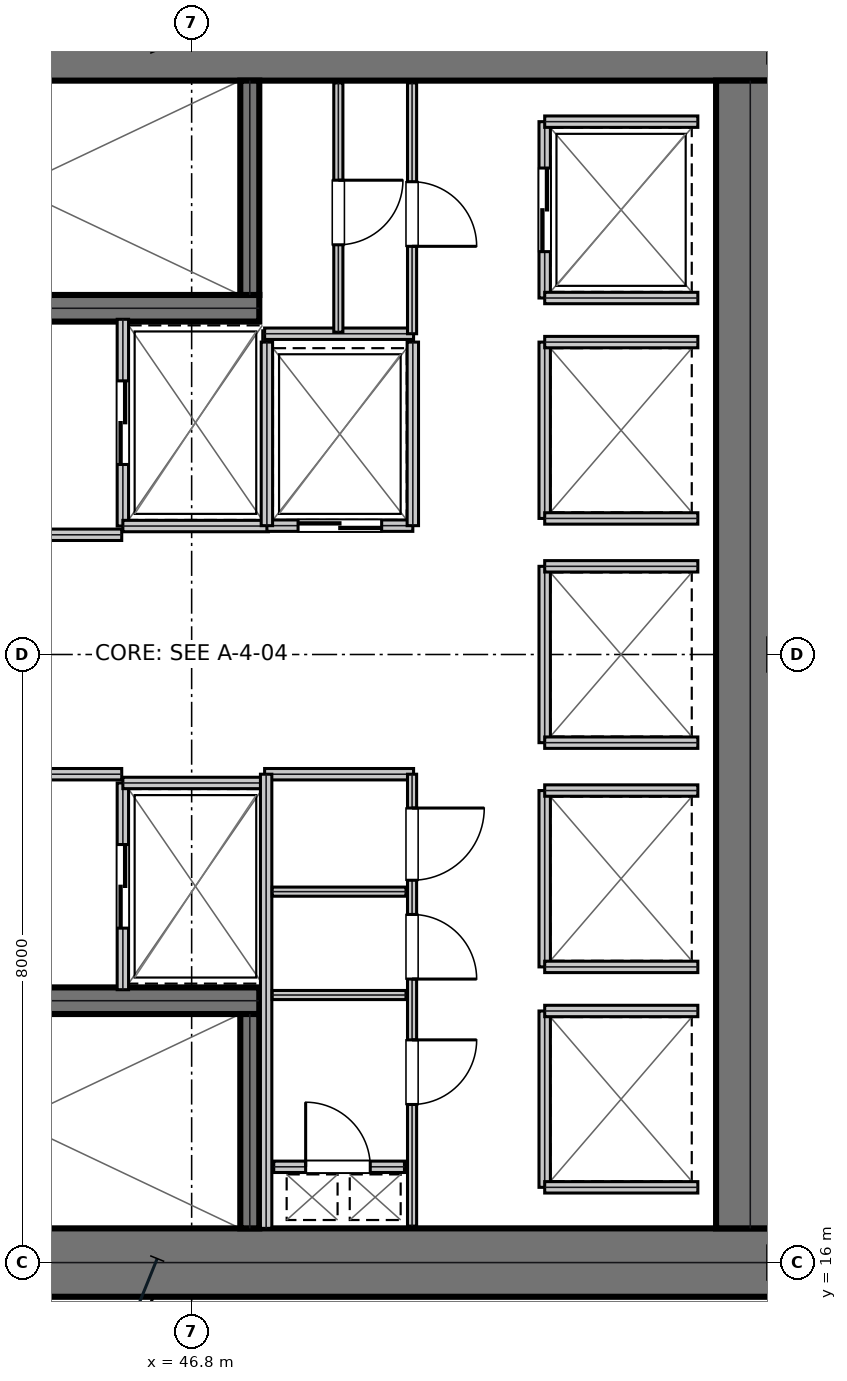
"""IFC4 building model, lengths in metres.
Left out: names, types, materials, properties, quantities, classifications, styles, units other than length and angle.
Written with IfcOpenShell. Run it as: python <this file> out.ifc"""

import sys

from ifc_helpers import new_model, si_unit, direction, frame, frame_2d, origin, place, context, subcontext, project, spatial, rectangle, extrude, element, fill, save


model = new_model("IFC4")
c1 = context("Model", 3, precision=1e-05, world=origin(), true_north=direction((0.0, 1.0)))
c2 = subcontext(c1, "Body", "Model", "MODEL_VIEW")
j1 = project(units=[si_unit("LENGTHUNIT", "METRE"), si_unit("PLANEANGLEUNIT", "RADIAN")], contexts=[c1])
p1 = place(None, origin())
s1 = spatial("IfcSite", under=j1, at=p1, CompositionType="ELEMENT")
p2 = place(p1, origin())
s2 = spatial("IfcBuilding", under=s1, at=p2, CompositionType="ELEMENT")
p3 = place(p2, frame((0.0, 0.0, 70.2)))
s3 = spatial("IfcBuildingStorey", under=s2, at=p3, CompositionType="ELEMENT", Elevation=70.2)
for number, where, z_axis, x_axis in (
    (1, (38.8, 32.0, 0.0), (0.0, 0.0, 1.0), (1.0, 0.0, 0.0)),
    (2, (38.8, 16.0, 0.0), (0.0, 0.0, 1.0), (1.0, 0.0, 0.0)),
):
    element("IfcWall", number, at=place(p3, frame(where, z_axis=z_axis, x_axis=x_axis)), inside=s3, PredefinedType="SHEAR", context=c2, shape_type="SweptSolid", body=[
        extrude(rectangle(XDim=16.0, YDim=0.9, at=frame_2d((8.0, 0.0))), origin(), (0.0, 0.0, 1.0), 3.81),
    ])
p4 = place(p3, frame((54.15, 16.45, 0.0), z_axis=(0.0, 0.0, 1.0), x_axis=(0.0, 1.0, 0.0)))
e3 = element("IfcWall", 3, at=p4, inside=s3, PredefinedType="SHEAR", context=c2, shape_type="SweptSolid", body=[
    extrude(rectangle(XDim=15.1, YDim=0.9, at=frame_2d((7.55, 0.0))), origin(), (0.0, 0.0, 1.0), 3.81),
])
p5 = place(p3, frame((39.98, 28.555, 0.0), z_axis=(0.0, 0.0, 1.0), x_axis=(1.0, 0.0, 0.0)))
e4 = element("IfcWall", 4, at=p5, inside=s3, PredefinedType="SHEAR", context=c2, shape_type="SweptSolid", body=[
    extrude(rectangle(XDim=7.71, YDim=0.35, at=frame_2d((3.855, 0.0))), origin(), (0.0, 0.0, 1.0), 3.81),
])
p6 = place(p5, frame((0.25, 0.0, 0.0)))
e5 = element("IfcOpeningElement", 5, at=p6, cuts=e4, PredefinedType="OPENING", context=c2, shape_type="SweptSolid", body=[
    extrude(rectangle(XDim=1.1, YDim=2.15, at=frame_2d((0.55, 1.075))), frame((0.0, 0.185, 0.0), z_axis=(0.0, -1.0, 0.0), x_axis=(1.0, 0.0, 0.0)), (0.0, 0.0, 1.0), 0.37),
])
p7 = place(p3, frame((39.98, 19.445, 0.0), z_axis=(0.0, 0.0, 1.0), x_axis=(1.0, 0.0, 0.0)))
e6 = element("IfcWall", 6, at=p7, inside=s3, PredefinedType="SHEAR", context=c2, shape_type="SweptSolid", body=[
    extrude(rectangle(XDim=7.71, YDim=0.35, at=frame_2d((3.855, 0.0))), origin(), (0.0, 0.0, 1.0), 3.81),
])
p8 = place(p7, frame((0.25, 0.0, 0.0)))
e7 = element("IfcOpeningElement", 7, at=p8, cuts=e6, PredefinedType="OPENING", context=c2, shape_type="SweptSolid", body=[
    extrude(rectangle(XDim=1.1, YDim=2.15, at=frame_2d((0.55, 1.075))), frame((0.0, 0.185, 0.0), z_axis=(0.0, -1.0, 0.0), x_axis=(1.0, 0.0, 0.0)), (0.0, 0.0, 1.0), 0.37),
])
for number, where, z_axis, x_axis in (
    (8, (47.565, 28.73, 0.0), (0.0, 0.0, 1.0), (0.0, 1.0, 0.0)),
    (9, (47.565, 16.45, 0.0), (0.0, 0.0, 1.0), (0.0, 1.0, 0.0)),
):
    element("IfcWall", number, at=place(p3, frame(where, z_axis=z_axis, x_axis=x_axis)), inside=s3, PredefinedType="SHEAR", context=c2, shape_type="SweptSolid", body=[
        extrude(rectangle(XDim=2.82, YDim=0.25, at=frame_2d((1.41, 0.0))), origin(), (0.0, 0.0, 1.0), 3.81),
    ])
p9 = place(p3, frame((39.98, 25.575, 0.0), z_axis=(0.0, 0.0, 1.0), x_axis=(1.0, 0.0, 0.0)))
e10 = element("IfcWall", 10, at=p9, inside=s3, PredefinedType="PARTITIONING", context=c2, shape_type="SweptSolid", body=[
    extrude(rectangle(XDim=5.9, YDim=0.15, at=frame_2d((2.95, 0.0))), origin(), (0.0, 0.0, 1.0), 3.81),
])
p10 = place(p9, frame((2.35, 0.0, 0.0)))
e11 = element("IfcOpeningElement", 11, at=p10, cuts=e10, PredefinedType="OPENING", context=c2, shape_type="SweptSolid", body=[
    extrude(rectangle(XDim=1.05, YDim=2.15, at=frame_2d((0.525, 1.075))), frame((0.0, 0.085, 0.0), z_axis=(0.0, -1.0, 0.0), x_axis=(1.0, 0.0, 0.0)), (0.0, 0.0, 1.0), 0.17),
])
p11 = place(p3, frame((39.98, 22.425, 0.0), z_axis=(0.0, 0.0, 1.0), x_axis=(1.0, 0.0, 0.0)))
e12 = element("IfcWall", 12, at=p11, inside=s3, PredefinedType="PARTITIONING", context=c2, shape_type="SweptSolid", body=[
    extrude(rectangle(XDim=5.9, YDim=0.15, at=frame_2d((2.95, 0.0))), origin(), (0.0, 0.0, 1.0), 3.81),
])
p12 = place(p11, frame((2.35, 0.0, 0.0)))
e13 = element("IfcOpeningElement", 13, at=p12, cuts=e12, PredefinedType="OPENING", context=c2, shape_type="SweptSolid", body=[
    extrude(rectangle(XDim=1.05, YDim=2.15, at=frame_2d((0.525, 1.075))), frame((0.0, 0.085, 0.0), z_axis=(0.0, -1.0, 0.0), x_axis=(1.0, 0.0, 0.0)), (0.0, 0.0, 1.0), 0.17),
])
p13 = place(p3, frame((45.895, 25.69, 0.0), z_axis=(0.0, 0.0, 1.0), x_axis=(0.0, 1.0, 0.0)))
e14 = element("IfcWall", 14, at=p13, inside=s3, PredefinedType="PARTITIONING", context=c2, shape_type="SweptSolid", body=[
    extrude(rectangle(XDim=2.72, YDim=0.15, at=frame_2d((1.36, 0.0))), origin(), (0.0, 0.0, 1.0), 3.81),
])
p14 = place(p13, frame((0.81, 0.0, 0.0)))
e15 = element("IfcOpeningElement", 15, at=p14, cuts=e14, PredefinedType="OPENING", context=c2, shape_type="SweptSolid", body=[
    extrude(rectangle(XDim=1.1, YDim=2.15, at=frame_2d((0.55, 1.075))), frame((0.0, 0.085, 0.0), z_axis=(0.0, -1.0, 0.0), x_axis=(1.0, 0.0, 0.0)), (0.0, 0.0, 1.0), 0.17),
])
p15 = place(p3, frame((45.895, 25.69, 0.0), z_axis=(0.0, 0.0, 1.0), x_axis=(1.0, 0.0, 0.0)))
e16 = element("IfcWall", 16, at=p15, inside=s3, PredefinedType="PARTITIONING", context=c2, shape_type="SweptSolid", body=[
    extrude(rectangle(XDim=1.915, YDim=0.15, at=frame_2d((0.958, 0.0))), origin(), (0.0, 0.0, 1.0), 3.81),
])
p16 = place(p3, frame((45.895, 19.59, 0.0), z_axis=(0.0, 0.0, 1.0), x_axis=(0.0, 1.0, 0.0)))
e17 = element("IfcWall", 17, at=p16, inside=s3, PredefinedType="PARTITIONING", context=c2, shape_type="SweptSolid", body=[
    extrude(rectangle(XDim=2.72, YDim=0.15, at=frame_2d((1.36, 0.0))), origin(), (0.0, 0.0, 1.0), 3.81),
])
p17 = place(p16, frame((0.81, 0.0, 0.0)))
e18 = element("IfcOpeningElement", 18, at=p17, cuts=e17, PredefinedType="OPENING", context=c2, shape_type="SweptSolid", body=[
    extrude(rectangle(XDim=1.1, YDim=2.15, at=frame_2d((0.55, 1.075))), frame((0.0, 0.085, 0.0), z_axis=(0.0, -1.0, 0.0), x_axis=(1.0, 0.0, 0.0)), (0.0, 0.0, 1.0), 0.17),
])
p18 = place(p3, frame((45.895, 22.31, 0.0), z_axis=(0.0, 0.0, 1.0), x_axis=(1.0, 0.0, 0.0)))
e19 = element("IfcWall", 19, at=p18, inside=s3, PredefinedType="PARTITIONING", context=c2, shape_type="SweptSolid", body=[
    extrude(rectangle(XDim=1.915, YDim=0.15, at=frame_2d((0.958, 0.0))), origin(), (0.0, 0.0, 1.0), 3.81),
])
p19 = place(p3, frame((47.79, 25.695, 0.0), z_axis=(0.0, 0.0, 1.0), x_axis=(1.0, 0.0, 0.0)))
e20 = element("IfcWall", 20, at=p19, inside=s3, PredefinedType="PARTITIONING", context=c2, shape_type="SweptSolid", body=[
    extrude(rectangle(XDim=1.92, YDim=0.15, at=frame_2d((0.96, 0.0))), origin(), (0.0, 0.0, 1.0), 3.81),
])
p20 = place(p19, frame((0.41, 0.0, 0.0)))
e21 = element("IfcOpeningElement", 21, at=p20, cuts=e20, PredefinedType="OPENING", context=c2, shape_type="SweptSolid", body=[
    extrude(rectangle(XDim=1.1, YDim=2.15, at=frame_2d((0.55, 1.075))), frame((0.0, 0.085, 0.0), z_axis=(0.0, -1.0, 0.0), x_axis=(1.0, 0.0, 0.0)), (0.0, 0.0, 1.0), 0.17),
])
for number, where, z_axis, x_axis in (
    (22, (47.79, 25.695, 0.0), (0.0, 0.0, 1.0), (0.0, 1.0, 0.0)),
    (23, (49.71, 25.695, 0.0), (0.0, 0.0, 1.0), (0.0, 1.0, 0.0)),
):
    element("IfcWall", number, at=place(p3, frame(where, z_axis=z_axis, x_axis=x_axis)), inside=s3, PredefinedType="PARTITIONING", context=c2, shape_type="SweptSolid", body=[
        extrude(rectangle(XDim=2.415, YDim=0.15, at=frame_2d((1.208, 0.0))), origin(), (0.0, 0.0, 1.0), 3.81),
    ])
p21 = place(p3, frame((51.445, 28.69, 0.0), z_axis=(0.0, 0.0, 1.0), x_axis=(0.0, 1.0, 0.0)))
e24 = element("IfcWall", 24, at=p21, inside=s3, PredefinedType="PARTITIONING", context=c2, shape_type="SweptSolid", body=[
    extrude(rectangle(XDim=2.32, YDim=0.15, at=frame_2d((1.16, 0.0))), origin(), (0.0, 0.0, 1.0), 3.81),
])
p22 = place(p21, frame((0.61, 0.0, 0.0)))
e25 = element("IfcOpeningElement", 25, at=p22, cuts=e24, PredefinedType="OPENING", context=c2, shape_type="SweptSolid", body=[
    extrude(rectangle(XDim=1.1, YDim=2.15, at=frame_2d((0.55, 1.075))), frame((0.0, 0.085, 0.0), z_axis=(0.0, -1.0, 0.0), x_axis=(1.0, 0.0, 0.0)), (0.0, 0.0, 1.0), 0.17),
])
for number, where, z_axis, x_axis in (
    (26, (51.445, 28.69, 0.0), (0.0, 0.0, 1.0), (1.0, 0.0, 0.0)),
    (27, (51.445, 31.01, 0.0), (0.0, 0.0, 1.0), (1.0, 0.0, 0.0)),
):
    element("IfcWall", number, at=place(p3, frame(where, z_axis=z_axis, x_axis=x_axis)), inside=s3, PredefinedType="PARTITIONING", context=c2, shape_type="SweptSolid", body=[
        extrude(rectangle(XDim=2.015, YDim=0.15, at=frame_2d((1.007, 0.0))), origin(), (0.0, 0.0, 1.0), 3.81),
    ])
p23 = place(p3, frame((51.445, 25.79, 0.0), z_axis=(0.0, 0.0, 1.0), x_axis=(0.0, 1.0, 0.0)))
e28 = element("IfcWall", 28, at=p23, inside=s3, PredefinedType="PARTITIONING", context=c2, shape_type="SweptSolid", body=[
    extrude(rectangle(XDim=2.32, YDim=0.15, at=frame_2d((1.16, 0.0))), origin(), (0.0, 0.0, 1.0), 3.81),
])
for number, where, z_axis, x_axis in (
    (29, (51.445, 25.79, 0.0), (0.0, 0.0, 1.0), (1.0, 0.0, 0.0)),
    (30, (51.445, 28.11, 0.0), (0.0, 0.0, 1.0), (1.0, 0.0, 0.0)),
):
    element("IfcWall", number, at=place(p3, frame(where, z_axis=z_axis, x_axis=x_axis)), inside=s3, PredefinedType="PARTITIONING", context=c2, shape_type="SweptSolid", body=[
        extrude(rectangle(XDim=2.015, YDim=0.15, at=frame_2d((1.007, 0.0))), origin(), (0.0, 0.0, 1.0), 3.81),
    ])
p24 = place(p3, frame((51.445, 19.89, 0.0), z_axis=(0.0, 0.0, 1.0), x_axis=(0.0, 1.0, 0.0)))
e31 = element("IfcWall", 31, at=p24, inside=s3, PredefinedType="PARTITIONING", context=c2, shape_type="SweptSolid", body=[
    extrude(rectangle(XDim=2.32, YDim=0.15, at=frame_2d((1.16, 0.0))), origin(), (0.0, 0.0, 1.0), 3.81),
])
for number, where, z_axis, x_axis in (
    (32, (51.445, 19.89, 0.0), (0.0, 0.0, 1.0), (1.0, 0.0, 0.0)),
    (33, (51.445, 22.21, 0.0), (0.0, 0.0, 1.0), (1.0, 0.0, 0.0)),
):
    element("IfcWall", number, at=place(p3, frame(where, z_axis=z_axis, x_axis=x_axis)), inside=s3, PredefinedType="PARTITIONING", context=c2, shape_type="SweptSolid", body=[
        extrude(rectangle(XDim=2.015, YDim=0.15, at=frame_2d((1.007, 0.0))), origin(), (0.0, 0.0, 1.0), 3.81),
    ])
p25 = place(p3, frame((51.445, 22.84, 0.0), z_axis=(0.0, 0.0, 1.0), x_axis=(0.0, 1.0, 0.0)))
e34 = element("IfcWall", 34, at=p25, inside=s3, PredefinedType="PARTITIONING", context=c2, shape_type="SweptSolid", body=[
    extrude(rectangle(XDim=2.32, YDim=0.15, at=frame_2d((1.16, 0.0))), origin(), (0.0, 0.0, 1.0), 3.81),
])
for number, where, z_axis, x_axis in (
    (35, (51.445, 22.84, 0.0), (0.0, 0.0, 1.0), (1.0, 0.0, 0.0)),
    (36, (51.445, 25.16, 0.0), (0.0, 0.0, 1.0), (1.0, 0.0, 0.0)),
):
    element("IfcWall", number, at=place(p3, frame(where, z_axis=z_axis, x_axis=x_axis)), inside=s3, PredefinedType="PARTITIONING", context=c2, shape_type="SweptSolid", body=[
        extrude(rectangle(XDim=2.015, YDim=0.15, at=frame_2d((1.007, 0.0))), origin(), (0.0, 0.0, 1.0), 3.81),
    ])
p26 = place(p3, frame((51.445, 16.99, 0.0), z_axis=(0.0, 0.0, 1.0), x_axis=(0.0, 1.0, 0.0)))
e37 = element("IfcWall", 37, at=p26, inside=s3, PredefinedType="PARTITIONING", context=c2, shape_type="SweptSolid", body=[
    extrude(rectangle(XDim=2.32, YDim=0.15, at=frame_2d((1.16, 0.0))), origin(), (0.0, 0.0, 1.0), 3.81),
])
for number, where, z_axis, x_axis in (
    (38, (51.445, 16.99, 0.0), (0.0, 0.0, 1.0), (1.0, 0.0, 0.0)),
    (39, (51.445, 19.31, 0.0), (0.0, 0.0, 1.0), (1.0, 0.0, 0.0)),
):
    element("IfcWall", number, at=place(p3, frame(where, z_axis=z_axis, x_axis=x_axis)), inside=s3, PredefinedType="PARTITIONING", context=c2, shape_type="SweptSolid", body=[
        extrude(rectangle(XDim=2.015, YDim=0.15, at=frame_2d((1.007, 0.0))), origin(), (0.0, 0.0, 1.0), 3.81),
    ])
p27 = place(p3, frame((47.88, 17.26, 0.0), z_axis=(0.0, 0.0, 1.0), x_axis=(1.0, 0.0, 0.0)))
e40 = element("IfcWall", 40, at=p27, inside=s3, PredefinedType="PARTITIONING", context=c2, shape_type="SweptSolid", body=[
    extrude(rectangle(XDim=1.72, YDim=0.15, at=frame_2d((0.86, 0.0))), origin(), (0.0, 0.0, 1.0), 3.81),
])
p28 = place(p27, frame((0.42, 0.0, 0.0)))
e41 = element("IfcOpeningElement", 41, at=p28, cuts=e40, PredefinedType="OPENING", context=c2, shape_type="SweptSolid", body=[
    extrude(rectangle(XDim=0.85, YDim=2.15, at=frame_2d((0.425, 1.075))), frame((0.0, 0.085, 0.0), z_axis=(0.0, -1.0, 0.0), x_axis=(1.0, 0.0, 0.0)), (0.0, 0.0, 1.0), 0.17),
])
p29 = place(p3, frame((47.76, 22.425, 0.0), z_axis=(0.0, 0.0, 1.0), x_axis=(1.0, 0.0, 0.0)))
e42 = element("IfcWall", 42, at=p29, inside=s3, PredefinedType="PARTITIONING", context=c2, shape_type="SweptSolid", body=[
    extrude(rectangle(XDim=1.96, YDim=0.15, at=frame_2d((0.98, 0.0))), origin(), (0.0, 0.0, 1.0), 3.81),
])
p30 = place(p3, frame((47.78, 16.45, 0.0), z_axis=(0.0, 0.0, 1.0), x_axis=(0.0, 1.0, 0.0)))
e43 = element("IfcWall", 43, at=p30, inside=s3, PredefinedType="PARTITIONING", context=c2, shape_type="SweptSolid", body=[
    extrude(rectangle(XDim=5.975, YDim=0.15, at=frame_2d((2.988, 0.0))), origin(), (0.0, 0.0, 1.0), 3.81),
])
for number, where, z_axis, x_axis in (
    (44, (47.86, 19.52, 0.0), (0.0, 0.0, 1.0), (1.0, 0.0, 0.0)),
    (45, (47.86, 20.88, 0.0), (0.0, 0.0, 1.0), (1.0, 0.0, 0.0)),
):
    element("IfcWall", number, at=place(p3, frame(where, z_axis=z_axis, x_axis=x_axis)), inside=s3, PredefinedType="PARTITIONING", context=c2, shape_type="SweptSolid", body=[
        extrude(rectangle(XDim=1.76, YDim=0.12, at=frame_2d((0.88, 0.0))), origin(), (0.0, 0.0, 1.0), 3.81),
    ])
p31 = place(p3, frame((49.7, 16.48, 0.0), z_axis=(0.0, 0.0, 1.0), x_axis=(0.0, 1.0, 0.0)))
e46 = element("IfcWall", 46, at=p31, inside=s3, PredefinedType="PARTITIONING", context=c2, shape_type="SweptSolid", body=[
    extrude(rectangle(XDim=5.945, YDim=0.12, at=frame_2d((2.973, 0.0))), origin(), (0.0, 0.0, 1.0), 3.81),
])
p32 = place(p31, frame((1.6, 0.0, 0.0)))
e47 = element("IfcOpeningElement", 47, at=p32, cuts=e46, PredefinedType="OPENING", context=c2, shape_type="SweptSolid", body=[
    extrude(rectangle(XDim=0.85, YDim=2.15, at=frame_2d((0.425, 1.075))), frame((0.0, 0.07, 0.0), z_axis=(0.0, -1.0, 0.0), x_axis=(1.0, 0.0, 0.0)), (0.0, 0.0, 1.0), 0.14),
])
p33 = place(p31, frame((3.25, 0.0, 0.0)))
e48 = element("IfcOpeningElement", 48, at=p33, cuts=e46, PredefinedType="OPENING", context=c2, shape_type="SweptSolid", body=[
    extrude(rectangle(XDim=0.85, YDim=2.15, at=frame_2d((0.425, 1.075))), frame((0.0, 0.07, 0.0), z_axis=(0.0, -1.0, 0.0), x_axis=(1.0, 0.0, 0.0)), (0.0, 0.0, 1.0), 0.14),
])
p34 = place(p31, frame((4.55, 0.0, 0.0)))
e49 = element("IfcOpeningElement", 49, at=p34, cuts=e46, PredefinedType="OPENING", context=c2, shape_type="SweptSolid", body=[
    extrude(rectangle(XDim=0.95, YDim=2.15, at=frame_2d((0.475, 1.075))), frame((0.0, 0.07, 0.0), z_axis=(0.0, -1.0, 0.0), x_axis=(1.0, 0.0, 0.0)), (0.0, 0.0, 1.0), 0.14),
])
p35 = place(p3, frame((47.76, 28.22, 0.0), z_axis=(0.0, 0.0, 1.0), x_axis=(1.0, 0.0, 0.0)))
e50 = element("IfcWall", 50, at=p35, inside=s3, PredefinedType="PARTITIONING", context=c2, shape_type="SweptSolid", body=[
    extrude(rectangle(XDim=1.96, YDim=0.15, at=frame_2d((0.98, 0.0))), origin(), (0.0, 0.0, 1.0), 3.81),
])
p36 = place(p3, frame((48.73, 28.24, 0.0), z_axis=(0.0, 0.0, 1.0), x_axis=(0.0, 1.0, 0.0)))
e51 = element("IfcWall", 51, at=p36, inside=s3, PredefinedType="PARTITIONING", context=c2, shape_type="SweptSolid", body=[
    extrude(rectangle(XDim=3.28, YDim=0.12, at=frame_2d((1.64, 0.0))), origin(), (0.0, 0.0, 1.0), 3.81),
])
p37 = place(p36, frame((1.15, 0.0, 0.0)))
e52 = element("IfcOpeningElement", 52, at=p37, cuts=e51, PredefinedType="OPENING", context=c2, shape_type="SweptSolid", body=[
    extrude(rectangle(XDim=0.85, YDim=2.15, at=frame_2d((0.425, 1.075))), frame((0.0, 0.07, 0.0), z_axis=(0.0, -1.0, 0.0), x_axis=(1.0, 0.0, 0.0)), (0.0, 0.0, 1.0), 0.14),
])
p38 = place(p3, frame((49.7, 28.22, 0.0), z_axis=(0.0, 0.0, 1.0), x_axis=(0.0, 1.0, 0.0)))
e53 = element("IfcWall", 53, at=p38, inside=s3, PredefinedType="PARTITIONING", context=c2, shape_type="SweptSolid", body=[
    extrude(rectangle(XDim=3.3, YDim=0.12, at=frame_2d((1.65, 0.0))), origin(), (0.0, 0.0, 1.0), 3.81),
])
p39 = place(p38, frame((1.15, 0.0, 0.0)))
e54 = element("IfcOpeningElement", 54, at=p39, cuts=e53, PredefinedType="OPENING", context=c2, shape_type="SweptSolid", body=[
    extrude(rectangle(XDim=0.85, YDim=2.15, at=frame_2d((0.425, 1.075))), frame((0.0, 0.07, 0.0), z_axis=(0.0, -1.0, 0.0), x_axis=(1.0, 0.0, 0.0)), (0.0, 0.0, 1.0), 0.14),
])
p40 = place(p14, frame((1.1, 0.0, 0.0), z_axis=(0.0, 0.0, 1.0), x_axis=(-1.0, 0.0, 0.0)))
e55 = element("IfcDoor", 55, at=p40, inside=s3, OperationType="DOUBLE_DOOR_SLIDING", PredefinedType="DOOR", context=c2, shape_type="SweptSolid", body=[
    extrude(rectangle(XDim=1.1, YDim=2.15, at=frame_2d((0.55, 1.075))), frame((0.0, 0.025, 0.0), z_axis=(0.0, -1.0, 0.0), x_axis=(1.0, 0.0, 0.0)), (0.0, 0.0, 1.0), 0.05),
])
fill(e15, e55)
p41 = place(p17, frame((1.1, 0.0, 0.0), z_axis=(0.0, 0.0, 1.0), x_axis=(-1.0, 0.0, 0.0)))
e56 = element("IfcDoor", 56, at=p41, inside=s3, OperationType="DOUBLE_DOOR_SLIDING", PredefinedType="DOOR", context=c2, shape_type="SweptSolid", body=[
    extrude(rectangle(XDim=1.1, YDim=2.15, at=frame_2d((0.55, 1.075))), frame((0.0, 0.025, 0.0), z_axis=(0.0, -1.0, 0.0), x_axis=(1.0, 0.0, 0.0)), (0.0, 0.0, 1.0), 0.05),
])
fill(e18, e56)
p42 = place(p20, frame((1.1, 0.0, 0.0), z_axis=(0.0, 0.0, 1.0), x_axis=(-1.0, 0.0, 0.0)))
e57 = element("IfcDoor", 57, at=p42, inside=s3, OperationType="DOUBLE_DOOR_SLIDING", PredefinedType="DOOR", context=c2, shape_type="SweptSolid", body=[
    extrude(rectangle(XDim=1.1, YDim=2.15, at=frame_2d((0.55, 1.075))), frame((0.0, 0.025, 0.0), z_axis=(0.0, -1.0, 0.0), x_axis=(1.0, 0.0, 0.0)), (0.0, 0.0, 1.0), 0.05),
])
fill(e21, e57)
p43 = place(p22, frame((1.1, 0.0, 0.0), z_axis=(0.0, 0.0, 1.0), x_axis=(-1.0, 0.0, 0.0)))
e58 = element("IfcDoor", 58, at=p43, inside=s3, OperationType="DOUBLE_DOOR_SLIDING", PredefinedType="DOOR", context=c2, shape_type="SweptSolid", body=[
    extrude(rectangle(XDim=1.1, YDim=2.15, at=frame_2d((0.55, 1.075))), frame((0.0, 0.025, 0.0), z_axis=(0.0, -1.0, 0.0), x_axis=(1.0, 0.0, 0.0)), (0.0, 0.0, 1.0), 0.05),
])
fill(e25, e58)
p44 = place(p28, origin())
e59 = element("IfcDoor", 59, at=p44, inside=s3, OperationType="SINGLE_SWING_LEFT", PredefinedType="TRAPDOOR", context=c2, shape_type="SweptSolid", body=[
    extrude(rectangle(XDim=0.85, YDim=2.15, at=frame_2d((0.425, 1.075))), frame((0.0, 0.025, 0.0), z_axis=(0.0, -1.0, 0.0), x_axis=(1.0, 0.0, 0.0)), (0.0, 0.0, 1.0), 0.05),
])
fill(e41, e59)
p45 = place(p32, frame((0.85, 0.0, 0.0), z_axis=(0.0, 0.0, 1.0), x_axis=(-1.0, 0.0, 0.0)))
e60 = element("IfcDoor", 60, at=p45, inside=s3, OperationType="SINGLE_SWING_LEFT", PredefinedType="DOOR", context=c2, shape_type="SweptSolid", body=[
    extrude(rectangle(XDim=0.85, YDim=2.15, at=frame_2d((0.425, 1.075))), frame((0.0, 0.025, 0.0), z_axis=(0.0, -1.0, 0.0), x_axis=(1.0, 0.0, 0.0)), (0.0, 0.0, 1.0), 0.05),
])
fill(e47, e60)
p46 = place(p33, frame((0.85, 0.0, 0.0), z_axis=(0.0, 0.0, 1.0), x_axis=(-1.0, 0.0, 0.0)))
e61 = element("IfcDoor", 61, at=p46, inside=s3, OperationType="SINGLE_SWING_RIGHT", PredefinedType="DOOR", context=c2, shape_type="SweptSolid", body=[
    extrude(rectangle(XDim=0.85, YDim=2.15, at=frame_2d((0.425, 1.075))), frame((0.0, 0.025, 0.0), z_axis=(0.0, -1.0, 0.0), x_axis=(1.0, 0.0, 0.0)), (0.0, 0.0, 1.0), 0.05),
])
fill(e48, e61)
p47 = place(p34, frame((0.95, 0.0, 0.0), z_axis=(0.0, 0.0, 1.0), x_axis=(-1.0, 0.0, 0.0)))
e62 = element("IfcDoor", 62, at=p47, inside=s3, OperationType="SINGLE_SWING_LEFT", PredefinedType="DOOR", context=c2, shape_type="SweptSolid", body=[
    extrude(rectangle(XDim=0.95, YDim=2.15, at=frame_2d((0.475, 1.075))), frame((0.0, 0.025, 0.0), z_axis=(0.0, -1.0, 0.0), x_axis=(1.0, 0.0, 0.0)), (0.0, 0.0, 1.0), 0.05),
])
fill(e49, e62)
p48 = place(p37, frame((0.85, 0.0, 0.0), z_axis=(0.0, 0.0, 1.0), x_axis=(-1.0, 0.0, 0.0)))
e63 = element("IfcDoor", 63, at=p48, inside=s3, OperationType="SINGLE_SWING_LEFT", PredefinedType="DOOR", context=c2, shape_type="SweptSolid", body=[
    extrude(rectangle(XDim=0.85, YDim=2.15, at=frame_2d((0.425, 1.075))), frame((0.0, 0.025, 0.0), z_axis=(0.0, -1.0, 0.0), x_axis=(1.0, 0.0, 0.0)), (0.0, 0.0, 1.0), 0.05),
])
fill(e52, e63)
p49 = place(p39, frame((0.85, 0.0, 0.0), z_axis=(0.0, 0.0, 1.0), x_axis=(-1.0, 0.0, 0.0)))
e64 = element("IfcDoor", 64, at=p49, inside=s3, OperationType="SINGLE_SWING_RIGHT", PredefinedType="DOOR", context=c2, shape_type="SweptSolid", body=[
    extrude(rectangle(XDim=0.85, YDim=2.15, at=frame_2d((0.425, 1.075))), frame((0.0, 0.025, 0.0), z_axis=(0.0, -1.0, 0.0), x_axis=(1.0, 0.0, 0.0)), (0.0, 0.0, 1.0), 0.05),
])
fill(e54, e64)
save(model, sys.argv[1])
